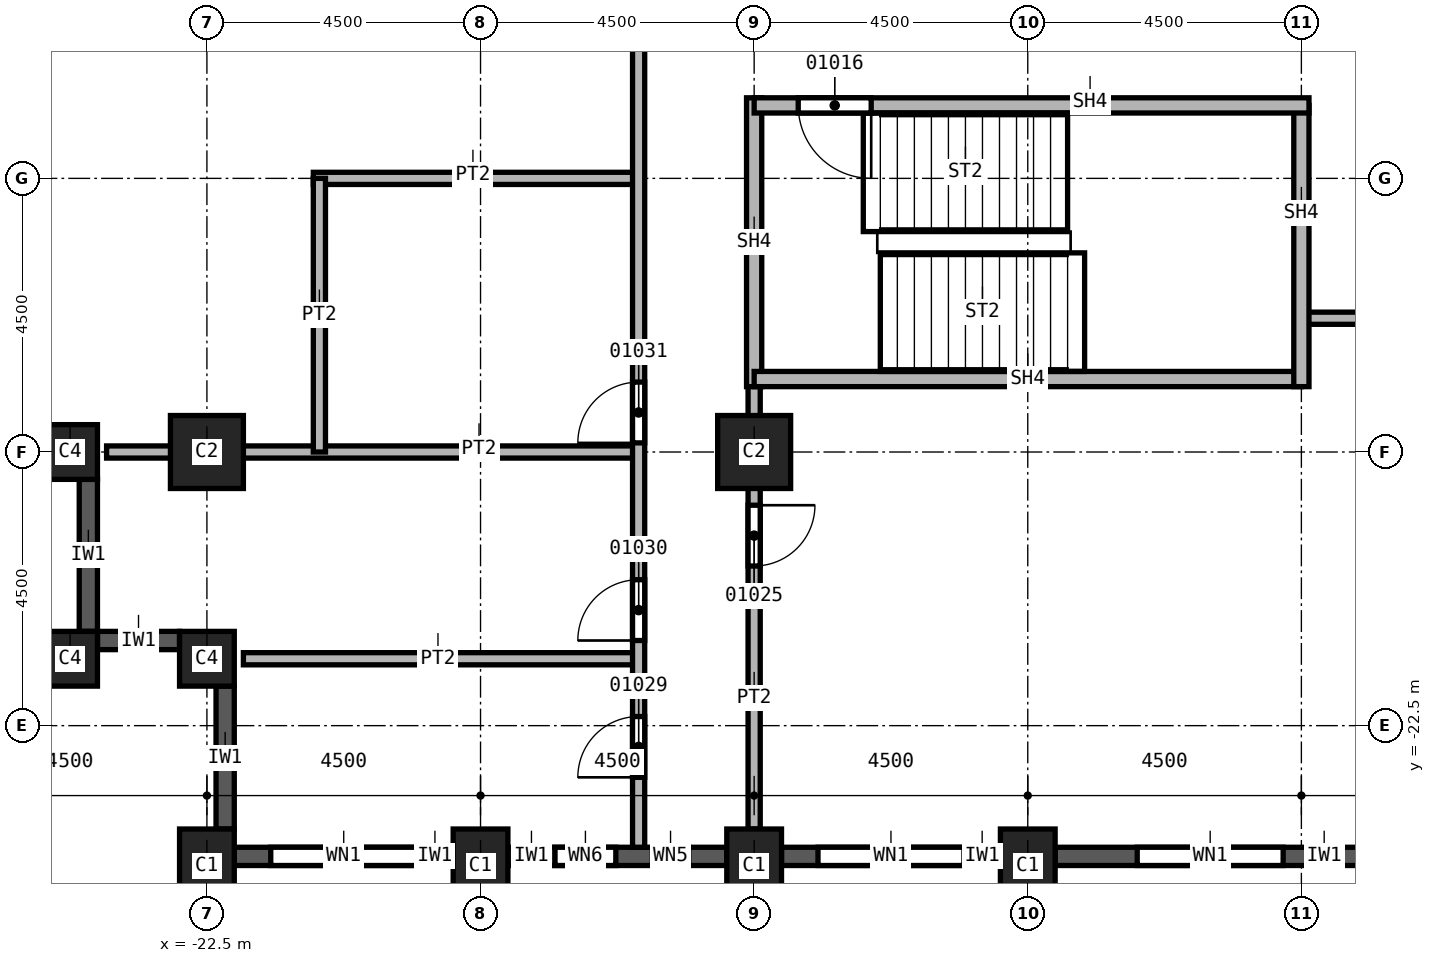
"""IFC4 building model, lengths in metres.
Left out: names, types, materials, properties, quantities, classifications, styles, units other than length and angle.
Written with IfcOpenShell. Run it as: python <this file> out.ifc"""

import sys

from ifc_helpers import new_model, si_unit, direction, frame, frame_2d, origin, origin_2d, place, context, subcontext, project, spatial, rectangle, extrude, element, fill, save


model = new_model("IFC4")
c1 = context("Model", 3, precision=1e-05, world=origin(), true_north=direction((0.0, 1.0)))
c2 = subcontext(c1, "Body", "Model", "MODEL_VIEW")
j1 = project(units=[si_unit("LENGTHUNIT", "METRE"), si_unit("PLANEANGLEUNIT", "RADIAN")], contexts=[c1])
p1 = place(None, origin())
s1 = spatial("IfcSite", under=j1, at=p1, CompositionType="ELEMENT")
p2 = place(p1, origin())
s2 = spatial("IfcBuilding", under=s1, at=p2, CompositionType="ELEMENT")
p3 = place(p2, frame((0.0, 0.0, 68.0)))
s3 = spatial("IfcBuildingStorey", under=s2, at=p3, CompositionType="ELEMENT", Elevation=68.0)
for number, where, z_axis, x_axis in (
    (1, (-13.5, -18.0, 0.0), (0.0, 0.0, 1.0), (1.0, 0.0, 0.0)),
    (2, (-22.5, -18.0, 0.0), (0.0, 0.0, 1.0), (1.0, 0.0, 0.0)),
):
    element("IfcColumn", number, at=place(p3, frame(where, z_axis=z_axis, x_axis=x_axis)), inside=s3, PredefinedType="COLUMN", context=c2, shape_type="SweptSolid", body=[
        extrude(rectangle(XDim=1.2, YDim=1.2, at=origin_2d()), origin(), (0.0, 0.0, 1.0), 3.7),
    ])
for number, where, z_axis, x_axis in (
    (3, (-9.0, -24.8, 0.0), (0.0, 0.0, 1.0), (1.0, 0.0, 0.0)),
    (4, (-13.5, -24.8, 0.0), (0.0, 0.0, 1.0), (1.0, 0.0, 0.0)),
    (5, (-18.0, -24.8, 0.0), (0.0, 0.0, 1.0), (1.0, 0.0, 0.0)),
    (6, (-22.5, -24.8, 0.0), (0.0, 0.0, 1.0), (1.0, 0.0, 0.0)),
):
    element("IfcColumn", number, at=place(p3, frame(where, z_axis=z_axis, x_axis=x_axis)), inside=s3, PredefinedType="COLUMN", context=c2, shape_type="SweptSolid", body=[
        extrude(rectangle(XDim=0.9, YDim=1.2, at=origin_2d()), origin(), (0.0, 0.0, 1.0), 3.7),
    ])
for number, where, z_axis, x_axis in (
    (7, (-22.5, -21.4, 0.0), (0.0, 0.0, 1.0), (1.0, 0.0, 0.0)),
    (8, (-24.75, -21.4, 0.0), (0.0, 0.0, 1.0), (1.0, 0.0, 0.0)),
    (9, (-24.75, -18.0, 0.0), (0.0, 0.0, 1.0), (1.0, 0.0, 0.0)),
):
    element("IfcColumn", number, at=place(p3, frame(where, z_axis=z_axis, x_axis=x_axis)), inside=s3, PredefinedType="COLUMN", context=c2, shape_type="SweptSolid", body=[
        extrude(rectangle(XDim=0.9, YDim=0.9, at=origin_2d()), origin(), (0.0, 0.0, 1.0), 3.7),
    ])
p4 = place(p3, frame((-24.45, -18.45, 0.0), z_axis=(0.0, 0.0, 1.0), x_axis=(0.0, -1.0, 0.0)))
e10 = element("IfcWall", 10, at=p4, inside=s3, PredefinedType="SOLIDWALL", context=c2, shape_type="SweptSolid", body=[
    extrude(rectangle(XDim=2.5, YDim=0.3, at=frame_2d((1.25, 0.0))), origin(), (0.0, 0.0, 1.0), 3.1),
])
p5 = place(p3, frame((-24.3, -21.1, 0.0), z_axis=(0.0, 0.0, 1.0), x_axis=(1.0, 0.0, 0.0)))
e11 = element("IfcWall", 11, at=p5, inside=s3, PredefinedType="SOLIDWALL", context=c2, shape_type="SweptSolid", body=[
    extrude(rectangle(XDim=1.35, YDim=0.3, at=frame_2d((0.675, 0.0))), origin(), (0.0, 0.0, 1.0), 3.1),
])
p6 = place(p3, frame((-22.2, -21.85, 0.0), z_axis=(0.0, 0.0, 1.0), x_axis=(0.0, -1.0, 0.0)))
e12 = element("IfcWall", 12, at=p6, inside=s3, PredefinedType="SOLIDWALL", context=c2, shape_type="SweptSolid", body=[
    extrude(rectangle(XDim=2.35, YDim=0.3, at=frame_2d((1.175, 0.0))), origin(), (0.0, 0.0, 1.0), 3.1),
])
p7 = place(p3, frame((-22.05, -24.65, 0.0), z_axis=(0.0, 0.0, 1.0), x_axis=(1.0, 0.0, 0.0)))
e13 = element("IfcWall", 13, at=p7, inside=s3, PredefinedType="SOLIDWALL", context=c2, shape_type="SweptSolid", body=[
    extrude(rectangle(XDim=3.6, YDim=0.3, at=frame_2d((1.8, 0.0))), origin(), (0.0, 0.0, 1.0), 3.1),
])
p8 = place(p7, frame((0.6, 0.0, 0.8)))
e14 = element("IfcOpeningElement", 14, at=p8, cuts=e13, PredefinedType="OPENING", context=c2, shape_type="SweptSolid", body=[
    extrude(rectangle(XDim=2.4, YDim=1.95, at=frame_2d((1.2, 0.975))), frame((0.0, 0.15, 0.0), z_axis=(0.0, -1.0, 0.0), x_axis=(1.0, 0.0, 0.0)), (0.0, 0.0, 1.0), 0.3),
])
p9 = place(p3, frame((-17.55, -24.65, 0.0), z_axis=(0.0, 0.0, 1.0), x_axis=(1.0, 0.0, 0.0)))
e15 = element("IfcWall", 15, at=p9, inside=s3, PredefinedType="SOLIDWALL", context=c2, shape_type="SweptSolid", body=[
    extrude(rectangle(XDim=3.6, YDim=0.3, at=frame_2d((1.8, 0.0))), origin(), (0.0, 0.0, 1.0), 3.1),
])
p10 = place(p9, frame((0.775, 0.0, 0.8)))
e16 = element("IfcOpeningElement", 16, at=p10, cuts=e15, PredefinedType="OPENING", context=c2, shape_type="SweptSolid", body=[
    extrude(rectangle(XDim=1.0, YDim=1.95, at=frame_2d((0.5, 0.975))), frame((0.0, 0.15, 0.0), z_axis=(0.0, -1.0, 0.0), x_axis=(1.0, 0.0, 0.0)), (0.0, 0.0, 1.0), 0.3),
])
p11 = place(p9, frame((2.375, 0.0, 0.8)))
e17 = element("IfcOpeningElement", 17, at=p11, cuts=e15, PredefinedType="OPENING", context=c2, shape_type="SweptSolid", body=[
    extrude(rectangle(XDim=0.6, YDim=1.95, at=frame_2d((0.3, 0.975))), frame((0.0, 0.15, 0.0), z_axis=(0.0, -1.0, 0.0), x_axis=(1.0, 0.0, 0.0)), (0.0, 0.0, 1.0), 0.3),
])
p12 = place(p3, frame((-13.05, -24.65, 0.0), z_axis=(0.0, 0.0, 1.0), x_axis=(1.0, 0.0, 0.0)))
e18 = element("IfcWall", 18, at=p12, inside=s3, PredefinedType="SOLIDWALL", context=c2, shape_type="SweptSolid", body=[
    extrude(rectangle(XDim=3.6, YDim=0.3, at=frame_2d((1.8, 0.0))), origin(), (0.0, 0.0, 1.0), 3.1),
])
p13 = place(p12, frame((0.6, 0.0, 0.8)))
e19 = element("IfcOpeningElement", 19, at=p13, cuts=e18, PredefinedType="OPENING", context=c2, shape_type="SweptSolid", body=[
    extrude(rectangle(XDim=2.4, YDim=1.95, at=frame_2d((1.2, 0.975))), frame((0.0, 0.15, 0.0), z_axis=(0.0, -1.0, 0.0), x_axis=(1.0, 0.0, 0.0)), (0.0, 0.0, 1.0), 0.3),
])
p14 = place(p3, frame((-8.55, -24.65, 0.0), z_axis=(0.0, 0.0, 1.0), x_axis=(1.0, 0.0, 0.0)))
e20 = element("IfcWall", 20, at=p14, inside=s3, PredefinedType="SOLIDWALL", context=c2, shape_type="SweptSolid", body=[
    extrude(rectangle(XDim=5.1, YDim=0.3, at=frame_2d((2.55, 0.0))), origin(), (0.0, 0.0, 1.0), 3.1),
])
p15 = place(p14, frame((1.35, 0.0, 0.8)))
e21 = element("IfcOpeningElement", 21, at=p15, cuts=e20, PredefinedType="OPENING", context=c2, shape_type="SweptSolid", body=[
    extrude(rectangle(XDim=2.4, YDim=1.95, at=frame_2d((1.2, 0.975))), frame((0.0, 0.15, 0.0), z_axis=(0.0, -1.0, 0.0), x_axis=(1.0, 0.0, 0.0)), (0.0, 0.0, 1.0), 0.3),
])
p16 = place(p3, frame((-24.15, -18.0, 0.0), z_axis=(0.0, 0.0, 1.0), x_axis=(1.0, 0.0, 0.0)))
e22 = element("IfcWall", 22, at=p16, inside=s3, PredefinedType="PARTITIONING", context=c2, shape_type="SweptSolid", body=[
    extrude(rectangle(XDim=8.75, YDim=0.2, at=frame_2d((4.375, 0.0))), origin(), (0.0, 0.0, 1.0), 3.7),
])
p17 = place(p3, frame((-21.9, -21.4, 0.0), z_axis=(0.0, 0.0, 1.0), x_axis=(1.0, 0.0, 0.0)))
e23 = element("IfcWall", 23, at=p17, inside=s3, PredefinedType="PARTITIONING", context=c2, shape_type="SweptSolid", body=[
    extrude(rectangle(XDim=6.5, YDim=0.2, at=frame_2d((3.25, 0.0))), origin(), (0.0, 0.0, 1.0), 3.7),
])
p18 = place(p3, frame((-20.75, -13.5, 0.0), z_axis=(0.0, 0.0, 1.0), x_axis=(1.0, 0.0, 0.0)))
e24 = element("IfcWall", 24, at=p18, inside=s3, PredefinedType="PARTITIONING", context=c2, shape_type="SweptSolid", body=[
    extrude(rectangle(XDim=5.35, YDim=0.2, at=frame_2d((2.675, 0.0))), origin(), (0.0, 0.0, 1.0), 3.7),
])
p19 = place(p3, frame((-20.65, -18.0, 0.0), z_axis=(0.0, 0.0, 1.0), x_axis=(0.0, 1.0, 0.0)))
e25 = element("IfcWall", 25, at=p19, inside=s3, PredefinedType="PARTITIONING", context=c2, shape_type="SweptSolid", body=[
    extrude(rectangle(XDim=4.5, YDim=0.2, at=frame_2d((2.25, 0.0))), origin(), (0.0, 0.0, 1.0), 3.7),
])
p20 = place(p3, frame((-15.4, -24.5, 0.0), z_axis=(0.0, 0.0, 1.0), x_axis=(0.0, 1.0, 0.0)))
e26 = element("IfcWall", 26, at=p20, inside=s3, PredefinedType="PARTITIONING", context=c2, shape_type="SweptSolid", body=[
    extrude(rectangle(XDim=25.35, YDim=0.2, at=frame_2d((12.675, 0.0))), origin(), (0.0, 0.0, 1.0), 3.7),
])
p21 = place(p20, frame((1.15, 0.0, 0.0)))
e27 = element("IfcOpeningElement", 27, at=p21, cuts=e26, PredefinedType="OPENING", context=c2, shape_type="SweptSolid", body=[
    extrude(rectangle(XDim=1.0, YDim=2.1, at=frame_2d((0.5, 1.05))), frame((0.0, 0.1, 0.0), z_axis=(0.0, -1.0, 0.0), x_axis=(1.0, 0.0, 0.0)), (0.0, 0.0, 1.0), 0.2),
])
p22 = place(p20, frame((3.4, 0.0, 0.0)))
e28 = element("IfcOpeningElement", 28, at=p22, cuts=e26, PredefinedType="OPENING", context=c2, shape_type="SweptSolid", body=[
    extrude(rectangle(XDim=1.0, YDim=2.1, at=frame_2d((0.5, 1.05))), frame((0.0, 0.1, 0.0), z_axis=(0.0, -1.0, 0.0), x_axis=(1.0, 0.0, 0.0)), (0.0, 0.0, 1.0), 0.2),
])
p23 = place(p20, frame((6.65, 0.0, 0.0)))
e29 = element("IfcOpeningElement", 29, at=p23, cuts=e26, PredefinedType="OPENING", context=c2, shape_type="SweptSolid", body=[
    extrude(rectangle(XDim=1.0, YDim=2.1, at=frame_2d((0.5, 1.05))), frame((0.0, 0.1, 0.0), z_axis=(0.0, -1.0, 0.0), x_axis=(1.0, 0.0, 0.0)), (0.0, 0.0, 1.0), 0.2),
])
p24 = place(p20, frame((14.9, 0.0, 0.0)))
e30 = element("IfcOpeningElement", 30, at=p24, cuts=e26, PredefinedType="OPENING", context=c2, shape_type="SweptSolid", body=[
    extrude(rectangle(XDim=1.0, YDim=2.1, at=frame_2d((0.5, 1.05))), frame((0.0, 0.1, 0.0), z_axis=(0.0, -1.0, 0.0), x_axis=(1.0, 0.0, 0.0)), (0.0, 0.0, 1.0), 0.2),
])
p25 = place(p3, frame((-13.5, -16.675, 0.0), z_axis=(0.0, 0.0, 1.0), x_axis=(0.0, -1.0, 0.0)))
e31 = element("IfcWall", 31, at=p25, inside=s3, PredefinedType="PARTITIONING", context=c2, shape_type="SweptSolid", body=[
    extrude(rectangle(XDim=7.525, YDim=0.2, at=frame_2d((3.762, 0.0))), origin(), (0.0, 0.0, 1.0), 3.7),
])
p26 = place(p25, frame((2.2, 0.0, 0.0)))
e32 = element("IfcOpeningElement", 32, at=p26, cuts=e31, PredefinedType="OPENING", context=c2, shape_type="SweptSolid", body=[
    extrude(rectangle(XDim=1.0, YDim=2.1, at=frame_2d((0.5, 1.05))), frame((0.0, 0.1, 0.0), z_axis=(0.0, -1.0, 0.0), x_axis=(1.0, 0.0, 0.0)), (0.0, 0.0, 1.0), 0.2),
])
p27 = place(p3, frame((-0.9, -15.8, 0.0), z_axis=(0.0, 0.0, 1.0), x_axis=(-1.0, 0.0, 0.0)))
e33 = element("IfcWall", 33, at=p27, inside=s3, PredefinedType="PARTITIONING", context=c2, shape_type="SweptSolid", body=[
    extrude(rectangle(XDim=3.6, YDim=0.2, at=frame_2d((1.8, 0.0))), origin(), (0.0, 0.0, 1.0), 3.083),
])
p28 = place(p3, frame((-13.5, -12.175, 0.0), z_axis=(0.0, 0.0, 1.0), x_axis=(0.0, -1.0, 0.0)))
e34 = element("IfcWall", 34, at=p28, inside=s3, PredefinedType="SOLIDWALL", context=c2, shape_type="SweptSolid", body=[
    extrude(rectangle(XDim=4.75, YDim=0.25, at=frame_2d((2.375, 0.0))), origin(), (0.0, 0.0, 1.0), 3.7),
])
p29 = place(p3, frame((-4.5, -16.8, 0.0), z_axis=(0.0, 0.0, 1.0), x_axis=(-1.0, 0.0, 0.0)))
e35 = element("IfcWall", 35, at=p29, inside=s3, PredefinedType="SOLIDWALL", context=c2, shape_type="SweptSolid", body=[
    extrude(rectangle(XDim=9.0, YDim=0.25, at=frame_2d((4.5, 0.0))), origin(), (0.0, 0.0, 1.0), 3.7),
])
p30 = place(p3, frame((-4.5, -12.3, 0.0), z_axis=(0.0, 0.0, 1.0), x_axis=(0.0, -1.0, 0.0)))
e36 = element("IfcWall", 36, at=p30, inside=s3, PredefinedType="SOLIDWALL", context=c2, shape_type="SweptSolid", body=[
    extrude(rectangle(XDim=4.625, YDim=0.25, at=frame_2d((2.312, 0.0))), origin(), (0.0, 0.0, 1.0), 3.7),
])
p31 = place(p3, frame((-4.375, -12.3, 0.0), z_axis=(0.0, 0.0, 1.0), x_axis=(-1.0, 0.0, 0.0)))
e37 = element("IfcWall", 37, at=p31, inside=s3, PredefinedType="SOLIDWALL", context=c2, shape_type="SweptSolid", body=[
    extrude(rectangle(XDim=9.125, YDim=0.25, at=frame_2d((4.562, 0.0))), origin(), (0.0, 0.0, 1.0), 3.7),
])
p32 = place(p31, frame((7.2, 0.0, 0.0)))
e38 = element("IfcOpeningElement", 38, at=p32, cuts=e37, PredefinedType="OPENING", context=c2, shape_type="SweptSolid", body=[
    extrude(rectangle(XDim=1.2, YDim=2.1, at=frame_2d((0.6, 1.05))), frame((0.0, 0.125, 0.0), z_axis=(0.0, -1.0, 0.0), x_axis=(1.0, 0.0, 0.0)), (0.0, 0.0, 1.0), 0.25),
])
p33 = place(p8, origin())
e39 = element("IfcWindow", 39, at=p33, inside=s3, PartitioningType="SINGLE_PANEL", PredefinedType="WINDOW", context=c2, shape_type="SweptSolid", body=[
    extrude(rectangle(XDim=2.4, YDim=1.95, at=frame_2d((1.2, 0.975))), frame((0.0, 0.03, 0.0), z_axis=(0.0, -1.0, 0.0), x_axis=(1.0, 0.0, 0.0)), (0.0, 0.0, 1.0), 0.06),
])
fill(e14, e39)
p34 = place(p13, origin())
e40 = element("IfcWindow", 40, at=p34, inside=s3, PartitioningType="SINGLE_PANEL", PredefinedType="WINDOW", context=c2, shape_type="SweptSolid", body=[
    extrude(rectangle(XDim=2.4, YDim=1.95, at=frame_2d((1.2, 0.975))), frame((0.0, 0.03, 0.0), z_axis=(0.0, -1.0, 0.0), x_axis=(1.0, 0.0, 0.0)), (0.0, 0.0, 1.0), 0.06),
])
fill(e19, e40)
p35 = place(p15, origin())
e41 = element("IfcWindow", 41, at=p35, inside=s3, PartitioningType="SINGLE_PANEL", PredefinedType="WINDOW", context=c2, shape_type="SweptSolid", body=[
    extrude(rectangle(XDim=2.4, YDim=1.95, at=frame_2d((1.2, 0.975))), frame((0.0, 0.03, 0.0), z_axis=(0.0, -1.0, 0.0), x_axis=(1.0, 0.0, 0.0)), (0.0, 0.0, 1.0), 0.06),
])
fill(e21, e41)
p36 = place(p32, origin())
e42 = element("IfcDoor", 42, at=p36, inside=s3, OperationType="SINGLE_SWING_LEFT", PredefinedType="DOOR", context=c2, shape_type="SweptSolid", body=[
    extrude(rectangle(XDim=1.2, YDim=2.1, at=frame_2d((0.6, 1.05))), frame((0.0, 0.025, 0.0), z_axis=(0.0, -1.0, 0.0), x_axis=(1.0, 0.0, 0.0)), (0.0, 0.0, 1.0), 0.05),
])
fill(e38, e42)
p37 = place(p26, origin())
e43 = element("IfcDoor", 43, at=p37, inside=s3, OperationType="SINGLE_SWING_RIGHT", PredefinedType="DOOR", context=c2, shape_type="SweptSolid", body=[
    extrude(rectangle(XDim=1.0, YDim=2.1, at=frame_2d((0.5, 1.05))), frame((0.0, 0.025, 0.0), z_axis=(0.0, -1.0, 0.0), x_axis=(1.0, 0.0, 0.0)), (0.0, 0.0, 1.0), 0.05),
])
fill(e32, e43)
p38 = place(p21, origin())
e44 = element("IfcDoor", 44, at=p38, inside=s3, OperationType="SINGLE_SWING_RIGHT", PredefinedType="DOOR", context=c2, shape_type="SweptSolid", body=[
    extrude(rectangle(XDim=1.0, YDim=2.1, at=frame_2d((0.5, 1.05))), frame((0.0, 0.025, 0.0), z_axis=(0.0, -1.0, 0.0), x_axis=(1.0, 0.0, 0.0)), (0.0, 0.0, 1.0), 0.05),
])
fill(e27, e44)
p39 = place(p22, origin())
e45 = element("IfcDoor", 45, at=p39, inside=s3, OperationType="SINGLE_SWING_LEFT", PredefinedType="DOOR", context=c2, shape_type="SweptSolid", body=[
    extrude(rectangle(XDim=1.0, YDim=2.1, at=frame_2d((0.5, 1.05))), frame((0.0, 0.025, 0.0), z_axis=(0.0, -1.0, 0.0), x_axis=(1.0, 0.0, 0.0)), (0.0, 0.0, 1.0), 0.05),
])
fill(e28, e45)
p40 = place(p23, origin())
e46 = element("IfcDoor", 46, at=p40, inside=s3, OperationType="SINGLE_SWING_RIGHT", PredefinedType="DOOR", context=c2, shape_type="SweptSolid", body=[
    extrude(rectangle(XDim=1.0, YDim=2.1, at=frame_2d((0.5, 1.05))), frame((0.0, 0.025, 0.0), z_axis=(0.0, -1.0, 0.0), x_axis=(1.0, 0.0, 0.0)), (0.0, 0.0, 1.0), 0.05),
])
fill(e29, e46)
p41 = place(p10, origin())
e47 = element("IfcWindow", 47, at=p41, inside=s3, PartitioningType="SINGLE_PANEL", PredefinedType="WINDOW", context=c2, shape_type="SweptSolid", body=[
    extrude(rectangle(XDim=1.0, YDim=1.95, at=frame_2d((0.5, 0.975))), frame((0.0, 0.03, 0.0), z_axis=(0.0, -1.0, 0.0), x_axis=(1.0, 0.0, 0.0)), (0.0, 0.0, 1.0), 0.06),
])
fill(e16, e47)
p42 = place(p11, origin())
e48 = element("IfcWindow", 48, at=p42, inside=s3, PartitioningType="SINGLE_PANEL", PredefinedType="WINDOW", context=c2, shape_type="SweptSolid", body=[
    extrude(rectangle(XDim=0.6, YDim=1.95, at=frame_2d((0.3, 0.975))), frame((0.0, 0.03, 0.0), z_axis=(0.0, -1.0, 0.0), x_axis=(1.0, 0.0, 0.0)), (0.0, 0.0, 1.0), 0.06),
])
fill(e17, e48)
save(model, sys.argv[1])
